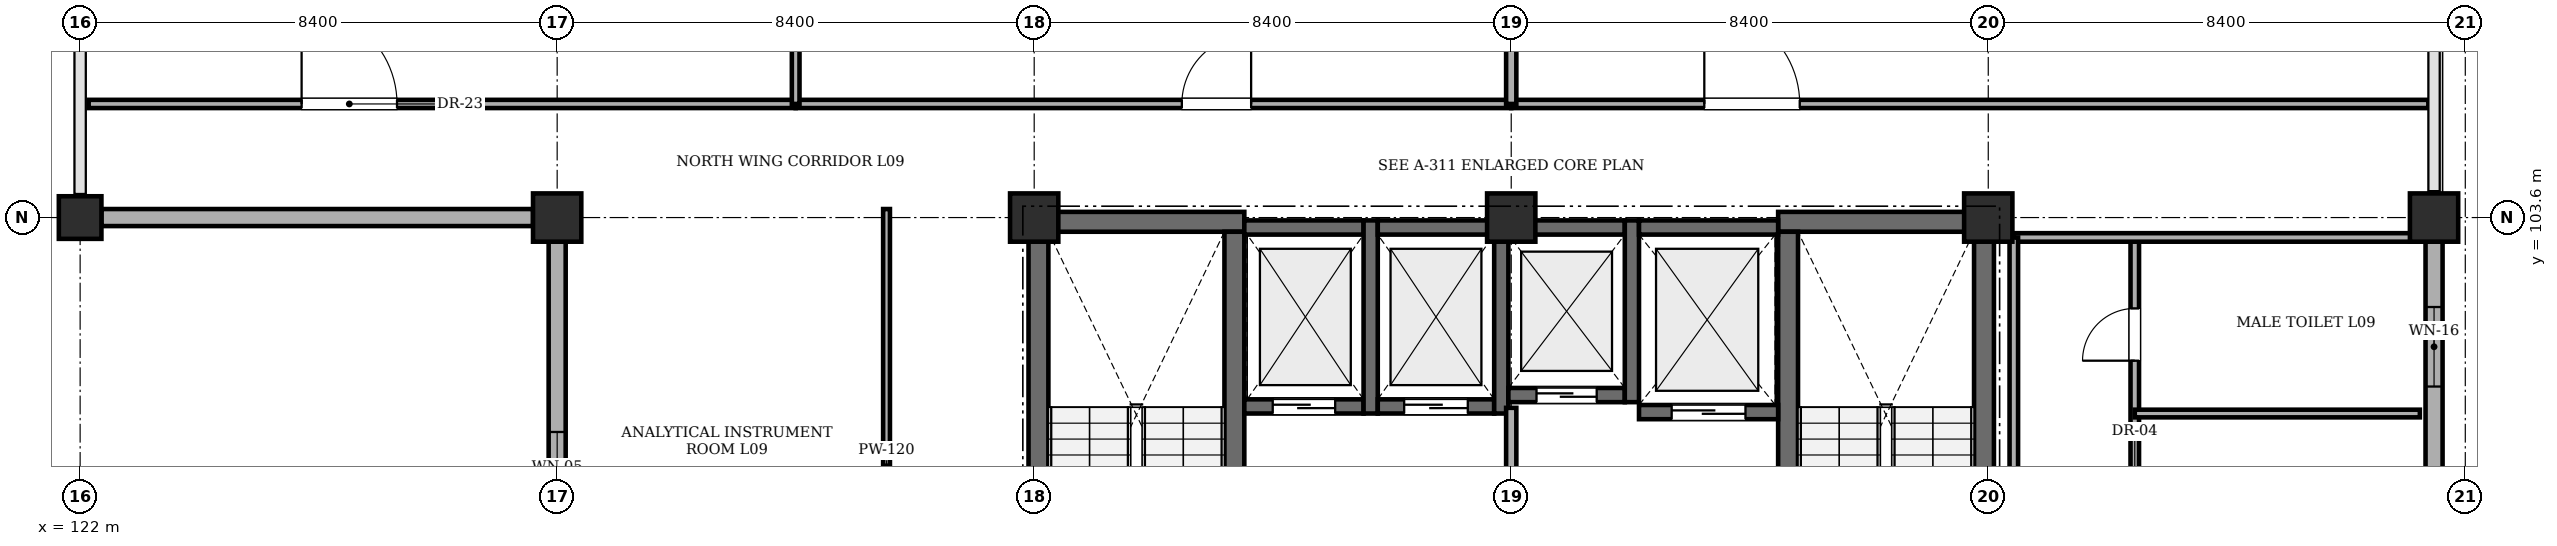
"""IFC4 building model, lengths in metres.
Left out: names, types, materials, properties, quantities, classifications, styles, units other than length and angle.
Written with IfcOpenShell. Run it as: python <this file> out.ifc"""

import sys

from ifc_helpers import new_model, si_unit, direction, frame, frame_2d, origin, origin_2d, place, context, subcontext, project, spatial, rectangle, extrude, element, fill, save


model = new_model("IFC4")
c1 = context("Model", 3, precision=1e-05, world=origin(), true_north=direction((0.0, 1.0)))
c2 = subcontext(c1, "Body", "Model", "MODEL_VIEW")
j1 = project(units=[si_unit("LENGTHUNIT", "METRE"), si_unit("PLANEANGLEUNIT", "RADIAN")], contexts=[c1])
p1 = place(None, origin())
s1 = spatial("IfcSite", under=j1, at=p1, CompositionType="ELEMENT")
p2 = place(p1, origin())
s2 = spatial("IfcBuilding", under=s1, at=p2, CompositionType="ELEMENT")
p3 = place(p2, frame((0.0, 0.0, 36.0)))
s3 = spatial("IfcBuildingStorey", under=s2, at=p3, CompositionType="ELEMENT", Elevation=36.0)
p4 = place(p3, frame((122.0, 103.6, 0.0), z_axis=(0.0, 0.0, 1.0), x_axis=(1.0, 0.0, 0.0)))
e1 = element("IfcColumn", 1, at=p4, inside=s3, PredefinedType="COLUMN", context=c2, shape_type="SweptSolid", body=[
    extrude(rectangle(XDim=0.75, YDim=0.75, at=origin_2d()), origin(), (0.0, 0.0, 1.0), 4.02),
])
for number, where, z_axis, x_axis in (
    (2, (130.4, 103.6, 0.0), (0.0, 0.0, 1.0), (1.0, 0.0, 0.0)),
    (3, (138.8, 103.6, 0.0), (0.0, 0.0, 1.0), (1.0, 0.0, 0.0)),
    (4, (147.2, 103.6, 0.0), (0.0, 0.0, 1.0), (1.0, 0.0, 0.0)),
    (5, (155.6, 103.6, 0.0), (0.0, 0.0, 1.0), (1.0, 0.0, 0.0)),
    (6, (163.45, 103.6, 0.0), (0.0, 0.0, 1.0), (1.0, 0.0, 0.0)),
):
    element("IfcColumn", number, at=place(p3, frame(where, z_axis=z_axis, x_axis=x_axis)), inside=s3, PredefinedType="COLUMN", context=c2, shape_type="SweptSolid", body=[
        extrude(rectangle(XDim=0.85, YDim=0.85, at=origin_2d()), origin(), (0.0, 0.0, 1.0), 4.02),
    ])
p5 = place(p3, frame((138.7, 103.525, 0.0), z_axis=(0.0, 0.0, 1.0), x_axis=(1.0, 0.0, 0.0)))
e7 = element("IfcWall", 7, at=p5, inside=s3, PredefinedType="SHEAR", context=c2, shape_type="SweptSolid", body=[
    extrude(rectangle(XDim=3.8, YDim=0.35, at=frame_2d((1.9, 0.0))), origin(), (0.0, 0.0, 1.0), 4.02),
])
p6 = place(p3, frame((138.875, 95.45, 0.0), z_axis=(0.0, 0.0, 1.0), x_axis=(0.0, 1.0, 0.0)))
e8 = element("IfcWall", 8, at=p6, inside=s3, PredefinedType="SHEAR", context=c2, shape_type="SweptSolid", body=[
    extrude(rectangle(XDim=7.9, YDim=0.35, at=frame_2d((3.95, 0.0))), origin(), (0.0, 0.0, 1.0), 4.02),
])
p7 = place(p3, frame((142.325, 95.45, 0.0), z_axis=(0.0, 0.0, 1.0), x_axis=(0.0, 1.0, 0.0)))
e9 = element("IfcWall", 9, at=p7, inside=s3, PredefinedType="SHEAR", context=c2, shape_type="SweptSolid", body=[
    extrude(rectangle(XDim=7.9, YDim=0.35, at=frame_2d((3.95, 0.0))), origin(), (0.0, 0.0, 1.0), 4.02),
])
p8 = place(p7, frame((0.22, 0.0, 0.0)))
e10 = element("IfcOpeningElement", 10, at=p8, cuts=e9, PredefinedType="OPENING", context=c2, shape_type="SweptSolid", body=[
    extrude(rectangle(XDim=1.15, YDim=2.15, at=frame_2d((0.575, 1.075))), frame((0.0, 0.185, 0.0), z_axis=(0.0, -1.0, 0.0), x_axis=(1.0, 0.0, 0.0)), (0.0, 0.0, 1.0), 0.37),
])
p9 = place(p3, frame((151.9, 103.525, 0.0), z_axis=(0.0, 0.0, 1.0), x_axis=(1.0, 0.0, 0.0)))
e11 = element("IfcWall", 11, at=p9, inside=s3, PredefinedType="SHEAR", context=c2, shape_type="SweptSolid", body=[
    extrude(rectangle(XDim=3.8, YDim=0.35, at=frame_2d((1.9, 0.0))), origin(), (0.0, 0.0, 1.0), 4.02),
])
p10 = place(p3, frame((152.075, 95.45, 0.0), z_axis=(0.0, 0.0, 1.0), x_axis=(0.0, 1.0, 0.0)))
e12 = element("IfcWall", 12, at=p10, inside=s3, PredefinedType="SHEAR", context=c2, shape_type="SweptSolid", body=[
    extrude(rectangle(XDim=7.9, YDim=0.35, at=frame_2d((3.95, 0.0))), origin(), (0.0, 0.0, 1.0), 4.02),
])
p11 = place(p10, frame((0.35, 0.0, 0.0)))
e13 = element("IfcOpeningElement", 13, at=p11, cuts=e12, PredefinedType="OPENING", context=c2, shape_type="SweptSolid", body=[
    extrude(rectangle(XDim=1.15, YDim=2.15, at=frame_2d((0.575, 1.075))), frame((0.0, 0.185, 0.0), z_axis=(0.0, -1.0, 0.0), x_axis=(1.0, 0.0, 0.0)), (0.0, 0.0, 1.0), 0.37),
])
p12 = place(p3, frame((155.525, 95.45, 0.0), z_axis=(0.0, 0.0, 1.0), x_axis=(0.0, 1.0, 0.0)))
e14 = element("IfcWall", 14, at=p12, inside=s3, PredefinedType="SHEAR", context=c2, shape_type="SweptSolid", body=[
    extrude(rectangle(XDim=7.9, YDim=0.35, at=frame_2d((3.95, 0.0))), origin(), (0.0, 0.0, 1.0), 4.02),
])
p13 = place(p3, frame((142.5, 100.275, 0.0), z_axis=(0.0, 0.0, 1.0), x_axis=(1.0, 0.0, 0.0)))
e15 = element("IfcWall", 15, at=p13, inside=s3, PredefinedType="SHEAR", context=c2, shape_type="SweptSolid", body=[
    extrude(rectangle(XDim=2.1, YDim=0.25, at=frame_2d((1.05, 0.0))), origin(), (0.0, 0.0, 1.0), 4.02),
])
p14 = place(p13, frame((0.5, 0.0, 0.0)))
e16 = element("IfcOpeningElement", 16, at=p14, cuts=e15, PredefinedType="OPENING", context=c2, shape_type="SweptSolid", body=[
    extrude(rectangle(XDim=1.1, YDim=2.15, at=frame_2d((0.55, 1.075))), frame((0.0, 0.135, 0.0), z_axis=(0.0, -1.0, 0.0), x_axis=(1.0, 0.0, 0.0)), (0.0, 0.0, 1.0), 0.27),
])
p15 = place(p3, frame((142.5, 103.425, 0.0), z_axis=(0.0, 0.0, 1.0), x_axis=(1.0, 0.0, 0.0)))
e17 = element("IfcWall", 17, at=p15, inside=s3, PredefinedType="SHEAR", context=c2, shape_type="SweptSolid", body=[
    extrude(rectangle(XDim=2.1, YDim=0.25, at=frame_2d((1.05, 0.0))), origin(), (0.0, 0.0, 1.0), 4.02),
])
p16 = place(p3, frame((144.725, 100.15, 0.0), z_axis=(0.0, 0.0, 1.0), x_axis=(0.0, 1.0, 0.0)))
e18 = element("IfcWall", 18, at=p16, inside=s3, PredefinedType="SHEAR", context=c2, shape_type="SweptSolid", body=[
    extrude(rectangle(XDim=3.4, YDim=0.25, at=frame_2d((1.7, 0.0))), origin(), (0.0, 0.0, 1.0), 4.02),
])
p17 = place(p3, frame((144.85, 100.275, 0.0), z_axis=(0.0, 0.0, 1.0), x_axis=(1.0, 0.0, 0.0)))
e19 = element("IfcWall", 19, at=p17, inside=s3, PredefinedType="SHEAR", context=c2, shape_type="SweptSolid", body=[
    extrude(rectangle(XDim=2.05, YDim=0.25, at=frame_2d((1.025, 0.0))), origin(), (0.0, 0.0, 1.0), 4.02),
])
p18 = place(p17, frame((0.465, 0.0, 0.0)))
e20 = element("IfcOpeningElement", 20, at=p18, cuts=e19, PredefinedType="OPENING", context=c2, shape_type="SweptSolid", body=[
    extrude(rectangle(XDim=1.12, YDim=2.15, at=frame_2d((0.56, 1.075))), frame((0.0, 0.135, 0.0), z_axis=(0.0, -1.0, 0.0), x_axis=(1.0, 0.0, 0.0)), (0.0, 0.0, 1.0), 0.27),
])
p19 = place(p3, frame((144.85, 103.425, 0.0), z_axis=(0.0, 0.0, 1.0), x_axis=(1.0, 0.0, 0.0)))
e21 = element("IfcWall", 21, at=p19, inside=s3, PredefinedType="SHEAR", context=c2, shape_type="SweptSolid", body=[
    extrude(rectangle(XDim=2.05, YDim=0.25, at=frame_2d((1.025, 0.0))), origin(), (0.0, 0.0, 1.0), 4.02),
])
p20 = place(p3, frame((147.025, 100.15, 0.0), z_axis=(0.0, 0.0, 1.0), x_axis=(0.0, 1.0, 0.0)))
e22 = element("IfcWall", 22, at=p20, inside=s3, PredefinedType="SHEAR", context=c2, shape_type="SweptSolid", body=[
    extrude(rectangle(XDim=3.4, YDim=0.25, at=frame_2d((1.7, 0.0))), origin(), (0.0, 0.0, 1.0), 4.02),
])
p21 = place(p3, frame((147.15, 100.475, 0.0), z_axis=(0.0, 0.0, 1.0), x_axis=(1.0, 0.0, 0.0)))
e23 = element("IfcWall", 23, at=p21, inside=s3, PredefinedType="SHEAR", context=c2, shape_type="SweptSolid", body=[
    extrude(rectangle(XDim=2.05, YDim=0.25, at=frame_2d((1.025, 0.0))), origin(), (0.0, 0.0, 1.0), 4.02),
])
p22 = place(p21, frame((0.495, 0.0, 0.0)))
e24 = element("IfcOpeningElement", 24, at=p22, cuts=e23, PredefinedType="OPENING", context=c2, shape_type="SweptSolid", body=[
    extrude(rectangle(XDim=1.06, YDim=2.15, at=frame_2d((0.53, 1.075))), frame((0.0, 0.135, 0.0), z_axis=(0.0, -1.0, 0.0), x_axis=(1.0, 0.0, 0.0)), (0.0, 0.0, 1.0), 0.27),
])
p23 = place(p3, frame((147.15, 103.425, 0.0), z_axis=(0.0, 0.0, 1.0), x_axis=(1.0, 0.0, 0.0)))
e25 = element("IfcWall", 25, at=p23, inside=s3, PredefinedType="SHEAR", context=c2, shape_type="SweptSolid", body=[
    extrude(rectangle(XDim=2.05, YDim=0.25, at=frame_2d((1.025, 0.0))), origin(), (0.0, 0.0, 1.0), 4.02),
])
p24 = place(p3, frame((149.325, 100.35, 0.0), z_axis=(0.0, 0.0, 1.0), x_axis=(0.0, 1.0, 0.0)))
e26 = element("IfcWall", 26, at=p24, inside=s3, PredefinedType="SHEAR", context=c2, shape_type="SweptSolid", body=[
    extrude(rectangle(XDim=3.2, YDim=0.25, at=frame_2d((1.6, 0.0))), origin(), (0.0, 0.0, 1.0), 4.02),
])
p25 = place(p3, frame((149.45, 100.175, 0.0), z_axis=(0.0, 0.0, 1.0), x_axis=(1.0, 0.0, 0.0)))
e27 = element("IfcWall", 27, at=p25, inside=s3, PredefinedType="SHEAR", context=c2, shape_type="SweptSolid", body=[
    extrude(rectangle(XDim=2.45, YDim=0.25, at=frame_2d((1.225, 0.0))), origin(), (0.0, 0.0, 1.0), 4.02),
])
p26 = place(p25, frame((0.575, 0.0, 0.0)))
e28 = element("IfcOpeningElement", 28, at=p26, cuts=e27, PredefinedType="OPENING", context=c2, shape_type="SweptSolid", body=[
    extrude(rectangle(XDim=1.3, YDim=2.25, at=frame_2d((0.65, 1.125))), frame((0.0, 0.135, 0.0), z_axis=(0.0, -1.0, 0.0), x_axis=(1.0, 0.0, 0.0)), (0.0, 0.0, 1.0), 0.27),
])
p27 = place(p3, frame((149.45, 103.425, 0.0), z_axis=(0.0, 0.0, 1.0), x_axis=(1.0, 0.0, 0.0)))
e29 = element("IfcWall", 29, at=p27, inside=s3, PredefinedType="SHEAR", context=c2, shape_type="SweptSolid", body=[
    extrude(rectangle(XDim=2.45, YDim=0.25, at=frame_2d((1.225, 0.0))), origin(), (0.0, 0.0, 1.0), 4.02),
])
p28 = place(p3, frame((163.45, 103.175, 0.0), z_axis=(0.0, 0.0, 1.0), x_axis=(0.0, -1.0, 0.0)))
e30 = element("IfcWall", 30, at=p28, inside=s3, PredefinedType="STANDARD", context=c2, shape_type="SweptSolid", body=[
    extrude(rectangle(XDim=7.55, YDim=0.3, at=frame_2d((3.775, 0.0))), origin(), (0.0, 0.0, 1.0), 3.32),
])
p29 = place(p28, frame((1.15, 0.0, 1.1)))
e31 = element("IfcOpeningElement", 31, at=p29, cuts=e30, PredefinedType="OPENING", context=c2, shape_type="SweptSolid", body=[
    extrude(rectangle(XDim=1.4, YDim=1.4, at=frame_2d((0.7, 0.7))), frame((0.0, 0.16, 0.0), z_axis=(0.0, -1.0, 0.0), x_axis=(1.0, 0.0, 0.0)), (0.0, 0.0, 1.0), 0.32),
])
p30 = place(p3, frame((130.4, 95.625, 0.0), z_axis=(0.0, 0.0, 1.0), x_axis=(0.0, 1.0, 0.0)))
e32 = element("IfcWall", 32, at=p30, inside=s3, PredefinedType="STANDARD", context=c2, shape_type="SweptSolid", body=[
    extrude(rectangle(XDim=7.55, YDim=0.3, at=frame_2d((3.775, 0.0))), origin(), (0.0, 0.0, 1.0), 3.32),
])
p31 = place(p30, frame((2.4, 0.0, 1.0)))
e33 = element("IfcOpeningElement", 33, at=p31, cuts=e32, PredefinedType="OPENING", context=c2, shape_type="SweptSolid", body=[
    extrude(rectangle(XDim=1.8, YDim=1.8, at=frame_2d((0.9, 0.9))), frame((0.0, 0.16, 0.0), z_axis=(0.0, -1.0, 0.0), x_axis=(1.0, 0.0, 0.0)), (0.0, 0.0, 1.0), 0.32),
])
p32 = place(p3, frame((129.975, 103.6, 0.0), z_axis=(0.0, 0.0, 1.0), x_axis=(-1.0, 0.0, 0.0)))
e34 = element("IfcWall", 34, at=p32, inside=s3, PredefinedType="STANDARD", context=c2, shape_type="SweptSolid", body=[
    extrude(rectangle(XDim=7.6, YDim=0.3, at=frame_2d((3.8, 0.0))), origin(), (0.0, 0.0, 1.0), 3.32),
])
p33 = place(p3, frame((147.2, 95.75, 0.0), z_axis=(0.0, 0.0, 1.0), x_axis=(0.0, 1.0, 0.0)))
e35 = element("IfcWall", 35, at=p33, inside=s3, PredefinedType="STANDARD", context=c2, shape_type="SweptSolid", body=[
    extrude(rectangle(XDim=4.5, YDim=0.18, at=frame_2d((2.25, 0.0))), origin(), (0.0, 0.0, 1.0), 3.32),
])
p34 = place(p3, frame((158.18, 94.68, 0.0), z_axis=(0.0, 0.0, 1.0), x_axis=(0.0, 1.0, 0.0)))
e36 = element("IfcWall", 36, at=p34, inside=s3, PredefinedType="PARTITIONING", context=c2, shape_type="SweptSolid", body=[
    extrude(rectangle(XDim=8.57, YDim=0.15, at=frame_2d((4.285, 0.0))), origin(), (0.0, 0.0, 1.0), 4.02),
])
p35 = place(p34, frame((0.8, 0.0, 0.0)))
e37 = element("IfcOpeningElement", 37, at=p35, cuts=e36, PredefinedType="OPENING", context=c2, shape_type="SweptSolid", body=[
    extrude(rectangle(XDim=1.0, YDim=2.12, at=frame_2d((0.5, 1.06))), frame((0.0, 0.085, 0.0), z_axis=(0.0, -1.0, 0.0), x_axis=(1.0, 0.0, 0.0)), (0.0, 0.0, 1.0), 0.17),
])
p36 = place(p34, frame((3.5, 0.0, 0.0)))
e38 = element("IfcOpeningElement", 38, at=p36, cuts=e36, PredefinedType="OPENING", context=c2, shape_type="SweptSolid", body=[
    extrude(rectangle(XDim=0.92, YDim=2.1, at=frame_2d((0.46, 1.05))), frame((0.0, 0.085, 0.0), z_axis=(0.0, -1.0, 0.0), x_axis=(1.0, 0.0, 0.0)), (0.0, 0.0, 1.0), 0.17),
])
p37 = place(p34, frame((6.4, 0.0, 0.0)))
e39 = element("IfcOpeningElement", 39, at=p37, cuts=e36, PredefinedType="OPENING", context=c2, shape_type="SweptSolid", body=[
    extrude(rectangle(XDim=0.92, YDim=2.1, at=frame_2d((0.46, 1.05))), frame((0.0, 0.085, 0.0), z_axis=(0.0, -1.0, 0.0), x_axis=(1.0, 0.0, 0.0)), (0.0, 0.0, 1.0), 0.17),
])
p38 = place(p3, frame((158.18, 100.15, 0.0), z_axis=(0.0, 0.0, 1.0), x_axis=(1.0, 0.0, 0.0)))
e40 = element("IfcWall", 40, at=p38, inside=s3, PredefinedType="PARTITIONING", context=c2, shape_type="SweptSolid", body=[
    extrude(rectangle(XDim=5.02, YDim=0.135, at=frame_2d((2.51, 0.0))), origin(), (0.0, 0.0, 1.0), 4.02),
])
p39 = place(p3, frame((156.05, 103.25, 0.0), z_axis=(0.0, 0.0, 1.0), x_axis=(1.0, 0.0, 0.0)))
e41 = element("IfcWall", 41, at=p39, inside=s3, PredefinedType="PARTITIONING", context=c2, shape_type="SweptSolid", body=[
    extrude(rectangle(XDim=7.15, YDim=0.15, at=frame_2d((3.575, 0.0))), origin(), (0.0, 0.0, 1.0), 4.02),
])
p40 = place(p3, frame((156.05, 94.68, 0.0), z_axis=(0.0, 0.0, 1.0), x_axis=(0.0, 1.0, 0.0)))
e42 = element("IfcWall", 42, at=p40, inside=s3, PredefinedType="PARTITIONING", context=c2, shape_type="SweptSolid", body=[
    extrude(rectangle(XDim=8.57, YDim=0.15, at=frame_2d((4.285, 0.0))), origin(), (0.0, 0.0, 1.0), 4.02),
])
p41 = place(p3, frame((136.2, 94.68, 0.0), z_axis=(0.0, 0.0, 1.0), x_axis=(0.0, 1.0, 0.0)))
e43 = element("IfcWall", 43, at=p41, inside=s3, PredefinedType="PARTITIONING", context=c2, shape_type="SweptSolid", body=[
    extrude(rectangle(XDim=9.07, YDim=0.12, at=frame_2d((4.535, 0.0))), origin(), (0.0, 0.0, 1.0), 4.02),
])
p42 = place(p3, frame((122.15, 105.6, 0.0), z_axis=(0.0, 0.0, 1.0), x_axis=(1.0, 0.0, 0.0)))
e44 = element("IfcWall", 44, at=p42, inside=s3, PredefinedType="PARTITIONING", context=c2, shape_type="SweptSolid", body=[
    extrude(rectangle(XDim=12.45, YDim=0.145, at=frame_2d((6.225, 0.0))), origin(), (0.0, 0.0, 1.0), 4.02),
])
p43 = place(p42, frame((3.75, 0.0, 0.0)))
e45 = element("IfcOpeningElement", 45, at=p43, cuts=e44, PredefinedType="OPENING", context=c2, shape_type="SweptSolid", body=[
    extrude(rectangle(XDim=1.68, YDim=2.24, at=frame_2d((0.84, 1.12))), frame((0.0, 0.083, 0.0), z_axis=(0.0, -1.0, 0.0), x_axis=(1.0, 0.0, 0.0)), (0.0, 0.0, 1.0), 0.165),
])
p44 = place(p3, frame((134.6, 105.6, 0.0), z_axis=(0.0, 0.0, 1.0), x_axis=(1.0, 0.0, 0.0)))
e46 = element("IfcWall", 46, at=p44, inside=s3, PredefinedType="PARTITIONING", context=c2, shape_type="SweptSolid", body=[
    extrude(rectangle(XDim=12.6, YDim=0.145, at=frame_2d((6.3, 0.0))), origin(), (0.0, 0.0, 1.0), 4.02),
])
p45 = place(p44, frame((6.8, 0.0, 0.0)))
e47 = element("IfcOpeningElement", 47, at=p45, cuts=e46, PredefinedType="OPENING", context=c2, shape_type="SweptSolid", body=[
    extrude(rectangle(XDim=1.22, YDim=2.2, at=frame_2d((0.61, 1.1))), frame((0.0, 0.083, 0.0), z_axis=(0.0, -1.0, 0.0), x_axis=(1.0, 0.0, 0.0)), (0.0, 0.0, 1.0), 0.165),
])
p46 = place(p3, frame((134.6, 105.6, 0.0), z_axis=(0.0, 0.0, 1.0), x_axis=(0.0, 1.0, 0.0)))
e48 = element("IfcWall", 48, at=p46, inside=s3, PredefinedType="PARTITIONING", context=c2, shape_type="SweptSolid", body=[
    extrude(rectangle(XDim=5.75, YDim=0.135, at=frame_2d((2.875, 0.0))), origin(), (0.0, 0.0, 1.0), 3.52),
])
p47 = place(p3, frame((147.2, 105.6, 0.0), z_axis=(0.0, 0.0, 1.0), x_axis=(1.0, 0.0, 0.0)))
e49 = element("IfcWall", 49, at=p47, inside=s3, PredefinedType="PARTITIONING", context=c2, shape_type="SweptSolid", body=[
    extrude(rectangle(XDim=16.15, YDim=0.145, at=frame_2d((8.075, 0.0))), origin(), (0.0, 0.0, 1.0), 4.02),
])
p48 = place(p47, frame((3.4, 0.0, 0.0)))
e50 = element("IfcOpeningElement", 50, at=p48, cuts=e49, PredefinedType="OPENING", context=c2, shape_type="SweptSolid", body=[
    extrude(rectangle(XDim=1.68, YDim=2.24, at=frame_2d((0.84, 1.12))), frame((0.0, 0.083, 0.0), z_axis=(0.0, -1.0, 0.0), x_axis=(1.0, 0.0, 0.0)), (0.0, 0.0, 1.0), 0.165),
])
p49 = place(p3, frame((147.2, 105.6, 0.0), z_axis=(0.0, 0.0, 1.0), x_axis=(0.0, 1.0, 0.0)))
e51 = element("IfcWall", 51, at=p49, inside=s3, PredefinedType="STANDARD", context=c2, shape_type="SweptSolid", body=[
    extrude(rectangle(XDim=5.75, YDim=0.18, at=frame_2d((2.875, 0.0))), origin(), (0.0, 0.0, 1.0), 3.32),
])
p50 = place(p29, origin())
e52 = element("IfcWindow", 52, at=p50, inside=s3, PartitioningType="SINGLE_PANEL", PredefinedType="WINDOW", context=c2, shape_type="SweptSolid", body=[
    extrude(rectangle(XDim=1.4, YDim=1.4, at=frame_2d((0.7, 0.7))), frame((0.0, 0.03, 0.0), z_axis=(0.0, -1.0, 0.0), x_axis=(1.0, 0.0, 0.0)), (0.0, 0.0, 1.0), 0.06),
])
fill(e31, e52)
p51 = place(p31, origin())
e53 = element("IfcWindow", 53, at=p51, inside=s3, PartitioningType="DOUBLE_PANEL_VERTICAL", PredefinedType="WINDOW", context=c2, shape_type="SweptSolid", body=[
    extrude(rectangle(XDim=1.8, YDim=1.8, at=frame_2d((0.9, 0.9))), frame((0.0, 0.03, 0.0), z_axis=(0.0, -1.0, 0.0), x_axis=(1.0, 0.0, 0.0)), (0.0, 0.0, 1.0), 0.06),
])
fill(e33, e53)
p52 = place(p37, origin())
e54 = element("IfcDoor", 54, at=p52, inside=s3, OperationType="SINGLE_SWING_LEFT", PredefinedType="DOOR", context=c2, shape_type="SweptSolid", body=[
    extrude(rectangle(XDim=0.92, YDim=2.1, at=frame_2d((0.46, 1.05))), frame((0.0, 0.025, 0.0), z_axis=(0.0, -1.0, 0.0), x_axis=(1.0, 0.0, 0.0)), (0.0, 0.0, 1.0), 0.05),
])
fill(e39, e54)
p53 = place(p43, origin())
e55 = element("IfcDoor", 55, at=p53, inside=s3, OperationType="SINGLE_SWING_LEFT", PredefinedType="DOOR", context=c2, shape_type="SweptSolid", body=[
    extrude(rectangle(XDim=1.68, YDim=2.24, at=frame_2d((0.84, 1.12))), frame((0.0, 0.025, 0.0), z_axis=(0.0, -1.0, 0.0), x_axis=(1.0, 0.0, 0.0)), (0.0, 0.0, 1.0), 0.05),
])
fill(e45, e55)
p54 = place(p45, origin())
e56 = element("IfcDoor", 56, at=p54, inside=s3, OperationType="SINGLE_SWING_RIGHT", PredefinedType="DOOR", context=c2, shape_type="SweptSolid", body=[
    extrude(rectangle(XDim=1.22, YDim=2.2, at=frame_2d((0.61, 1.1))), frame((0.0, 0.025, 0.0), z_axis=(0.0, -1.0, 0.0), x_axis=(1.0, 0.0, 0.0)), (0.0, 0.0, 1.0), 0.05),
])
fill(e47, e56)
p55 = place(p48, origin())
e57 = element("IfcDoor", 57, at=p55, inside=s3, OperationType="SINGLE_SWING_LEFT", PredefinedType="DOOR", context=c2, shape_type="SweptSolid", body=[
    extrude(rectangle(XDim=1.68, YDim=2.24, at=frame_2d((0.84, 1.12))), frame((0.0, 0.025, 0.0), z_axis=(0.0, -1.0, 0.0), x_axis=(1.0, 0.0, 0.0)), (0.0, 0.0, 1.0), 0.05),
])
fill(e50, e57)
p56 = place(p14, origin())
e58 = element("IfcDoor", 58, at=p56, inside=s3, OperationType="SLIDING_TO_LEFT", PredefinedType="DOOR", context=c2, shape_type="SweptSolid", body=[
    extrude(rectangle(XDim=1.1, YDim=2.15, at=frame_2d((0.55, 1.075))), frame((0.0, 0.025, 0.0), z_axis=(0.0, -1.0, 0.0), x_axis=(1.0, 0.0, 0.0)), (0.0, 0.0, 1.0), 0.05),
])
fill(e16, e58)
p57 = place(p18, origin())
e59 = element("IfcDoor", 59, at=p57, inside=s3, OperationType="SLIDING_TO_LEFT", PredefinedType="DOOR", context=c2, shape_type="SweptSolid", body=[
    extrude(rectangle(XDim=1.12, YDim=2.15, at=frame_2d((0.56, 1.075))), frame((0.0, 0.025, 0.0), z_axis=(0.0, -1.0, 0.0), x_axis=(1.0, 0.0, 0.0)), (0.0, 0.0, 1.0), 0.05),
])
fill(e20, e59)
p58 = place(p22, origin())
e60 = element("IfcDoor", 60, at=p58, inside=s3, OperationType="SLIDING_TO_LEFT", PredefinedType="DOOR", context=c2, shape_type="SweptSolid", body=[
    extrude(rectangle(XDim=1.06, YDim=2.15, at=frame_2d((0.53, 1.075))), frame((0.0, 0.025, 0.0), z_axis=(0.0, -1.0, 0.0), x_axis=(1.0, 0.0, 0.0)), (0.0, 0.0, 1.0), 0.05),
])
fill(e24, e60)
p59 = place(p26, origin())
e61 = element("IfcDoor", 61, at=p59, inside=s3, OperationType="SLIDING_TO_LEFT", PredefinedType="DOOR", context=c2, shape_type="SweptSolid", body=[
    extrude(rectangle(XDim=1.3, YDim=2.25, at=frame_2d((0.65, 1.125))), frame((0.0, 0.025, 0.0), z_axis=(0.0, -1.0, 0.0), x_axis=(1.0, 0.0, 0.0)), (0.0, 0.0, 1.0), 0.05),
])
fill(e28, e61)
save(model, sys.argv[1])
